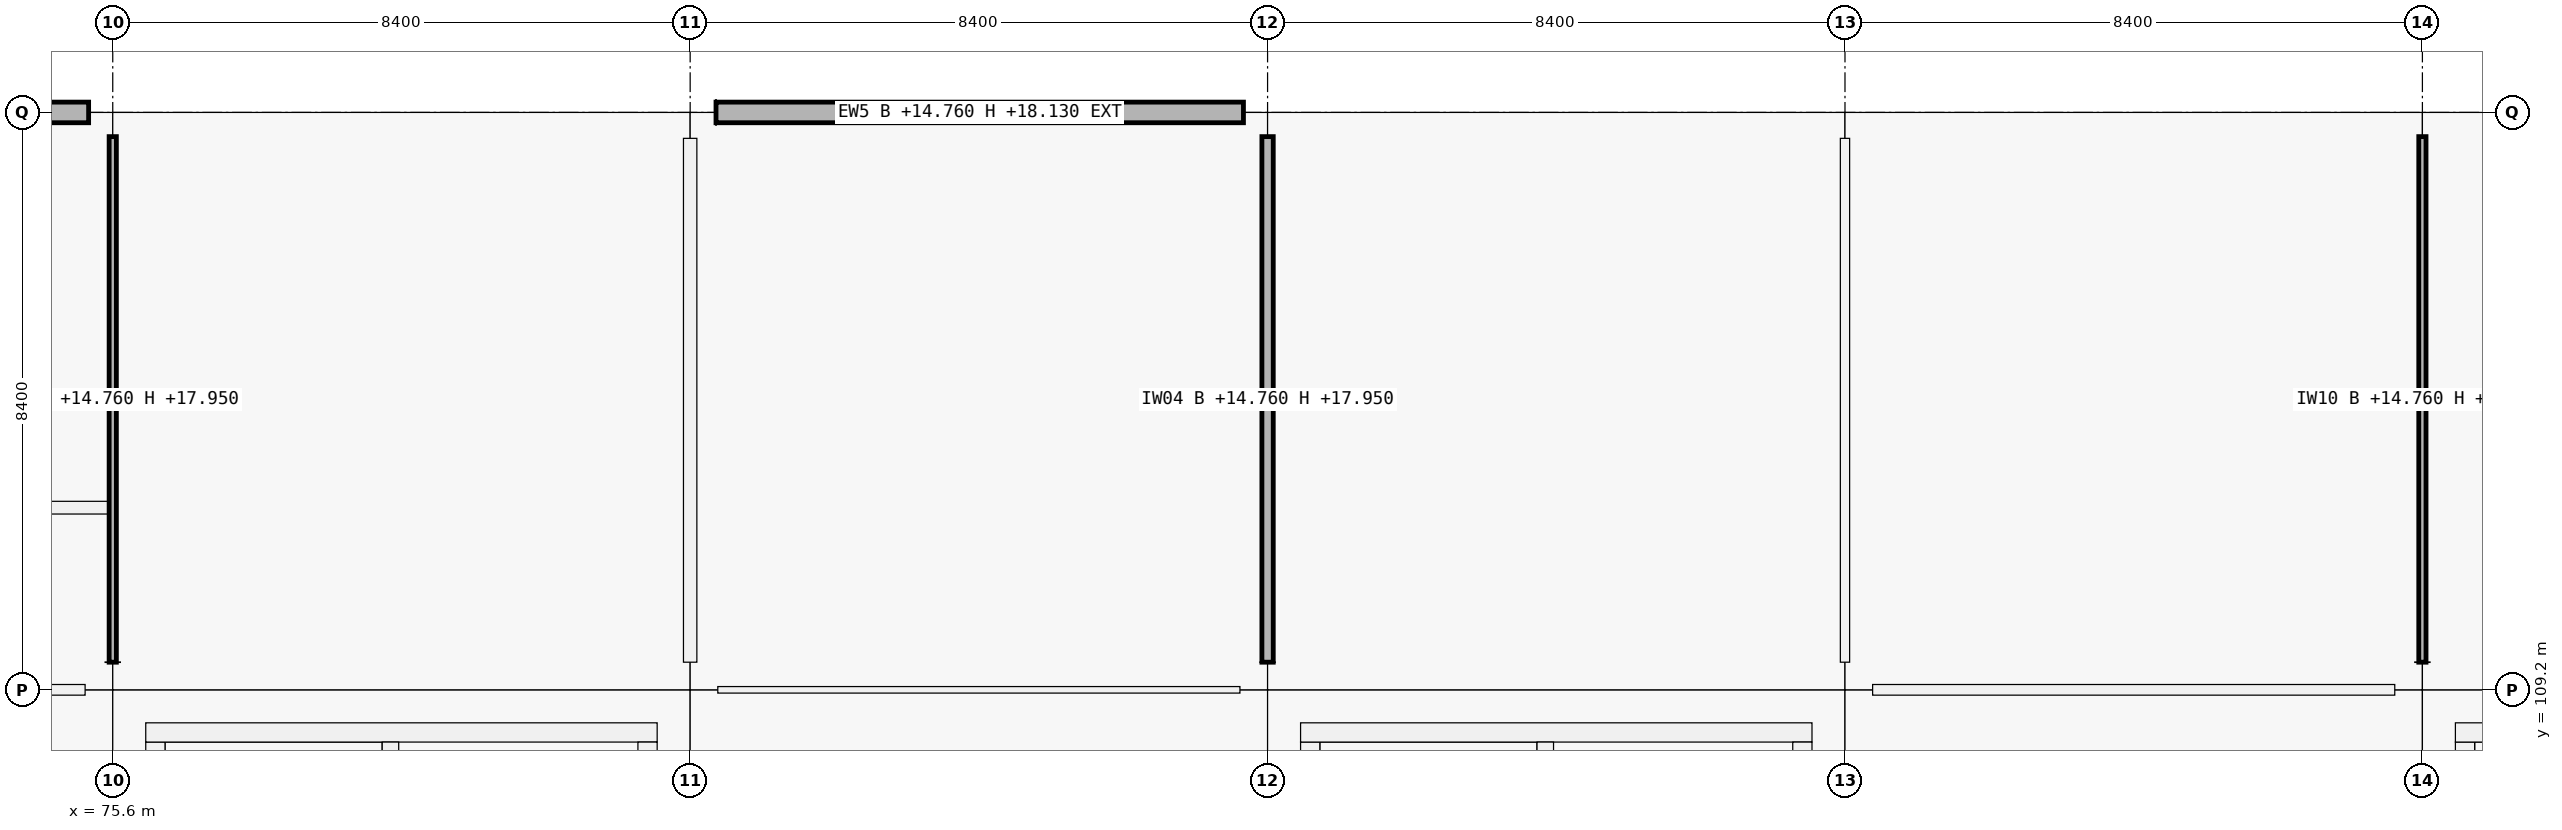
"""IFC4 building model, lengths in metres.
Left out: names, types, materials, properties, quantities, classifications, styles, units other than length and angle.
Written with IfcOpenShell. Run it as: python <this file> out.ifc"""

import sys

from ifc_helpers import new_model, si_unit, direction, frame, frame_2d, origin, origin_2d, place, context, subcontext, project, spatial, rectangle, extrude, element, fill, save


model = new_model("IFC4")
c1 = context("Model", 3, precision=1e-05, world=origin(), true_north=direction((0.0, 1.0)))
c2 = subcontext(c1, "Body", "Model", "MODEL_VIEW")
j1 = project(units=[si_unit("LENGTHUNIT", "METRE"), si_unit("PLANEANGLEUNIT", "RADIAN")], contexts=[c1])
p1 = place(None, origin())
s1 = spatial("IfcSite", under=j1, at=p1, CompositionType="ELEMENT")
p2 = place(p1, origin())
s2 = spatial("IfcBuilding", under=s1, at=p2, CompositionType="ELEMENT")
p3 = place(p2, frame((0.0, 0.0, 14.76)))
s3 = spatial("IfcBuildingStorey", under=s2, at=p3, CompositionType="ELEMENT", Elevation=14.76)
p4 = place(p3, frame((75.6, 109.2, 0.0), z_axis=(0.0, 0.0, 1.0), x_axis=(1.0, 0.0, 0.0)))
e1 = element("IfcColumn", 1, at=p4, inside=s3, PredefinedType="COLUMN", context=c2, shape_type="SweptSolid", body=[
    extrude(rectangle(XDim=0.8, YDim=0.8, at=origin_2d()), origin(), (0.0, 0.0, 1.0), 4.32),
])
p5 = place(p3, frame((75.6, 117.6, 0.0), z_axis=(0.0, 0.0, 1.0), x_axis=(1.0, 0.0, 0.0)))
e2 = element("IfcColumn", 2, at=p5, inside=s3, PredefinedType="COLUMN", context=c2, shape_type="SweptSolid", body=[
    extrude(rectangle(XDim=0.7, YDim=0.7, at=origin_2d()), origin(), (0.0, 0.0, 1.0), 4.32),
])
p6 = place(p3, frame((84.0, 109.2, 0.0), z_axis=(0.0, 0.0, 1.0), x_axis=(1.0, 0.0, 0.0)))
e3 = element("IfcColumn", 3, at=p6, inside=s3, PredefinedType="COLUMN", context=c2, shape_type="SweptSolid", body=[
    extrude(rectangle(XDim=0.8, YDim=0.8, at=origin_2d()), origin(), (0.0, 0.0, 1.0), 4.32),
])
p7 = place(p3, frame((84.0, 117.6, 0.0), z_axis=(0.0, 0.0, 1.0), x_axis=(1.0, 0.0, 0.0)))
e4 = element("IfcColumn", 4, at=p7, inside=s3, PredefinedType="COLUMN", context=c2, shape_type="SweptSolid", body=[
    extrude(rectangle(XDim=0.75, YDim=0.75, at=origin_2d()), origin(), (0.0, 0.0, 1.0), 4.32),
])
p8 = place(p3, frame((92.4, 109.2, 0.0), z_axis=(0.0, 0.0, 1.0), x_axis=(1.0, 0.0, 0.0)))
e5 = element("IfcColumn", 5, at=p8, inside=s3, PredefinedType="COLUMN", context=c2, shape_type="SweptSolid", body=[
    extrude(rectangle(XDim=0.8, YDim=0.8, at=origin_2d()), origin(), (0.0, 0.0, 1.0), 4.32),
])
p9 = place(p3, frame((92.4, 117.6, 0.0), z_axis=(0.0, 0.0, 1.0), x_axis=(1.0, 0.0, 0.0)))
e6 = element("IfcColumn", 6, at=p9, inside=s3, PredefinedType="COLUMN", context=c2, shape_type="SweptSolid", body=[
    extrude(rectangle(XDim=0.7, YDim=0.7, at=origin_2d()), origin(), (0.0, 0.0, 1.0), 4.32),
])
p10 = place(p3, frame((100.8, 109.2, 0.0), z_axis=(0.0, 0.0, 1.0), x_axis=(1.0, 0.0, 0.0)))
e7 = element("IfcColumn", 7, at=p10, inside=s3, PredefinedType="COLUMN", context=c2, shape_type="SweptSolid", body=[
    extrude(rectangle(XDim=0.8, YDim=0.8, at=origin_2d()), origin(), (0.0, 0.0, 1.0), 4.32),
])
p11 = place(p3, frame((100.8, 117.6, 0.0), z_axis=(0.0, 0.0, 1.0), x_axis=(1.0, 0.0, 0.0)))
e8 = element("IfcColumn", 8, at=p11, inside=s3, PredefinedType="COLUMN", context=c2, shape_type="SweptSolid", body=[
    extrude(rectangle(XDim=0.75, YDim=0.75, at=origin_2d()), origin(), (0.0, 0.0, 1.0), 4.32),
])
p12 = place(p3, frame((109.2, 109.2, 0.0), z_axis=(0.0, 0.0, 1.0), x_axis=(1.0, 0.0, 0.0)))
e9 = element("IfcColumn", 9, at=p12, inside=s3, PredefinedType="COLUMN", context=c2, shape_type="SweptSolid", body=[
    extrude(rectangle(XDim=0.8, YDim=0.8, at=origin_2d()), origin(), (0.0, 0.0, 1.0), 4.32),
])
p13 = place(p3, frame((109.2, 117.6, 0.0), z_axis=(0.0, 0.0, 1.0), x_axis=(1.0, 0.0, 0.0)))
e10 = element("IfcColumn", 10, at=p13, inside=s3, PredefinedType="COLUMN", context=c2, shape_type="SweptSolid", body=[
    extrude(rectangle(XDim=0.7, YDim=0.7, at=origin_2d()), origin(), (0.0, 0.0, 1.0), 4.32),
])
p14 = place(p3, frame((67.576, 117.6, 0.0), z_axis=(0.0, 0.0, 1.0), x_axis=(1.0, 0.0, 0.0)))
e11 = element("IfcWall", 11, at=p14, inside=s3, PredefinedType="SOLIDWALL", context=c2, shape_type="SweptSolid", body=[
    extrude(rectangle(XDim=7.673, YDim=0.3, at=frame_2d((3.836, 0.0))), origin(), (0.0, 0.0, 1.0), 3.37),
])
p15 = place(p14, frame((2.761, 0.0, 0.9)))
e12 = element("IfcOpeningElement", 12, at=p15, cuts=e11, PredefinedType="OPENING", context=c2, shape_type="SweptSolid", body=[
    extrude(rectangle(XDim=2.15, YDim=1.95, at=frame_2d((1.075, 0.975))), frame((0.0, 0.15, 0.0), z_axis=(0.0, -1.0, 0.0), x_axis=(1.0, 0.0, 0.0)), (0.0, 0.0, 1.0), 0.3),
])
p16 = place(p3, frame((84.376, 117.6, 0.0), z_axis=(0.0, 0.0, 1.0), x_axis=(1.0, 0.0, 0.0)))
e13 = element("IfcWall", 13, at=p16, inside=s3, PredefinedType="SOLIDWALL", context=c2, shape_type="SweptSolid", body=[
    extrude(rectangle(XDim=7.673, YDim=0.3, at=frame_2d((3.836, 0.0))), origin(), (0.0, 0.0, 1.0), 3.37),
])
p17 = place(p16, frame((2.662, 0.0, 0.9)))
e14 = element("IfcOpeningElement", 14, at=p17, cuts=e13, PredefinedType="OPENING", context=c2, shape_type="SweptSolid", body=[
    extrude(rectangle(XDim=2.35, YDim=1.6, at=frame_2d((1.175, 0.8))), frame((0.0, 0.15, 0.0), z_axis=(0.0, -1.0, 0.0), x_axis=(1.0, 0.0, 0.0)), (0.0, 0.0, 1.0), 0.3),
])
p18 = place(p3, frame((109.82, 101.56, 0.0), z_axis=(0.0, 0.0, 1.0), x_axis=(0.0, 1.0, 0.0)))
e15 = element("IfcWall", 15, at=p18, inside=s3, PredefinedType="SHEAR", context=c2, shape_type="SweptSolid", body=[
    extrude(rectangle(XDim=6.88, YDim=0.28, at=frame_2d((3.44, 0.0))), origin(), (0.0, 0.0, 1.0), 4.32),
])
p19 = place(p3, frame((109.68, 108.58, 0.0), z_axis=(0.0, 0.0, 1.0), x_axis=(1.0, 0.0, 0.0)))
e16 = element("IfcWall", 16, at=p19, inside=s3, PredefinedType="SHEAR", context=c2, shape_type="SweptSolid", body=[
    extrude(rectangle(XDim=7.44, YDim=0.28, at=frame_2d((3.72, 0.0))), origin(), (0.0, 0.0, 1.0), 4.32),
])
p20 = place(p3, frame((76.22, 101.56, 0.0), z_axis=(0.0, 0.0, 1.0), x_axis=(0.0, 1.0, 0.0)))
e17 = element("IfcWall", 17, at=p20, inside=s3, PredefinedType="SHEAR", context=c2, shape_type="SweptSolid", body=[
    extrude(rectangle(XDim=6.88, YDim=0.28, at=frame_2d((3.44, 0.0))), origin(), (0.0, 0.0, 1.0), 4.32),
])
p21 = place(p3, frame((76.08, 108.58, 0.0), z_axis=(0.0, 0.0, 1.0), x_axis=(1.0, 0.0, 0.0)))
e18 = element("IfcWall", 18, at=p21, inside=s3, PredefinedType="SHEAR", context=c2, shape_type="SweptSolid", body=[
    extrude(rectangle(XDim=7.44, YDim=0.28, at=frame_2d((3.72, 0.0))), origin(), (0.0, 0.0, 1.0), 4.32),
])
p22 = place(p3, frame((83.38, 108.44, 0.0), z_axis=(0.0, 0.0, 1.0), x_axis=(0.0, -1.0, 0.0)))
e19 = element("IfcWall", 19, at=p22, inside=s3, PredefinedType="SHEAR", context=c2, shape_type="SweptSolid", body=[
    extrude(rectangle(XDim=6.88, YDim=0.28, at=frame_2d((3.44, 0.0))), origin(), (0.0, 0.0, 1.0), 4.32),
])
p23 = place(p22, frame((3.99, 0.0, 0.0)))
e20 = element("IfcOpeningElement", 20, at=p23, cuts=e19, PredefinedType="OPENING", context=c2, shape_type="SweptSolid", body=[
    extrude(rectangle(XDim=1.5, YDim=2.15, at=frame_2d((0.75, 1.075))), frame((0.0, 0.14, 0.0), z_axis=(0.0, -1.0, 0.0), x_axis=(1.0, 0.0, 0.0)), (0.0, 0.0, 1.0), 0.28),
])
p24 = place(p3, frame((79.64, 101.56, 0.0), z_axis=(0.0, 0.0, 1.0), x_axis=(0.0, 1.0, 0.0)))
e21 = element("IfcWall", 21, at=p24, inside=s3, PredefinedType="SHEAR", context=c2, shape_type="SweptSolid", body=[
    extrude(rectangle(XDim=6.88, YDim=0.24, at=frame_2d((3.44, 0.0))), origin(), (0.0, 0.0, 1.0), 4.32),
])
p25 = place(p24, frame((0.12, 0.0, 0.0)))
e22 = element("IfcOpeningElement", 22, at=p25, cuts=e21, PredefinedType="OPENING", context=c2, shape_type="SweptSolid", body=[
    extrude(rectangle(XDim=1.0, YDim=2.15, at=frame_2d((0.5, 1.075))), frame((0.0, 0.12, 0.0), z_axis=(0.0, -1.0, 0.0), x_axis=(1.0, 0.0, 0.0)), (0.0, 0.0, 1.0), 0.24),
])
p26 = place(p3, frame((93.02, 101.56, 0.0), z_axis=(0.0, 0.0, 1.0), x_axis=(0.0, 1.0, 0.0)))
e23 = element("IfcWall", 23, at=p26, inside=s3, PredefinedType="SHEAR", context=c2, shape_type="SweptSolid", body=[
    extrude(rectangle(XDim=6.88, YDim=0.28, at=frame_2d((3.44, 0.0))), origin(), (0.0, 0.0, 1.0), 4.32),
])
p27 = place(p3, frame((92.88, 108.58, 0.0), z_axis=(0.0, 0.0, 1.0), x_axis=(1.0, 0.0, 0.0)))
e24 = element("IfcWall", 24, at=p27, inside=s3, PredefinedType="SHEAR", context=c2, shape_type="SweptSolid", body=[
    extrude(rectangle(XDim=7.44, YDim=0.28, at=frame_2d((3.72, 0.0))), origin(), (0.0, 0.0, 1.0), 4.32),
])
p28 = place(p3, frame((100.18, 108.44, 0.0), z_axis=(0.0, 0.0, 1.0), x_axis=(0.0, -1.0, 0.0)))
e25 = element("IfcWall", 25, at=p28, inside=s3, PredefinedType="SHEAR", context=c2, shape_type="SweptSolid", body=[
    extrude(rectangle(XDim=6.88, YDim=0.28, at=frame_2d((3.44, 0.0))), origin(), (0.0, 0.0, 1.0), 4.32),
])
p29 = place(p28, frame((3.99, 0.0, 0.0)))
e26 = element("IfcOpeningElement", 26, at=p29, cuts=e25, PredefinedType="OPENING", context=c2, shape_type="SweptSolid", body=[
    extrude(rectangle(XDim=1.5, YDim=2.15, at=frame_2d((0.75, 1.075))), frame((0.0, 0.14, 0.0), z_axis=(0.0, -1.0, 0.0), x_axis=(1.0, 0.0, 0.0)), (0.0, 0.0, 1.0), 0.28),
])
p30 = place(p3, frame((96.44, 101.56, 0.0), z_axis=(0.0, 0.0, 1.0), x_axis=(0.0, 1.0, 0.0)))
e27 = element("IfcWall", 27, at=p30, inside=s3, PredefinedType="SHEAR", context=c2, shape_type="SweptSolid", body=[
    extrude(rectangle(XDim=6.88, YDim=0.24, at=frame_2d((3.44, 0.0))), origin(), (0.0, 0.0, 1.0), 4.32),
])
p31 = place(p30, frame((0.12, 0.0, 0.0)))
e28 = element("IfcOpeningElement", 28, at=p31, cuts=e27, PredefinedType="OPENING", context=c2, shape_type="SweptSolid", body=[
    extrude(rectangle(XDim=1.0, YDim=2.15, at=frame_2d((0.5, 1.075))), frame((0.0, 0.12, 0.0), z_axis=(0.0, -1.0, 0.0), x_axis=(1.0, 0.0, 0.0)), (0.0, 0.0, 1.0), 0.24),
])
p32 = place(p3, frame((67.602, 109.2, 0.0), z_axis=(0.0, 0.0, 1.0), x_axis=(1.0, 0.0, 0.0)))
e29 = element("IfcWall", 29, at=p32, inside=s3, PredefinedType="PARTITIONING", context=c2, shape_type="SweptSolid", body=[
    extrude(rectangle(XDim=7.596, YDim=0.155, at=frame_2d((3.798, 0.0))), origin(), (0.0, 0.0, 1.0), 3.19),
])
p33 = place(p3, frame((84.402, 109.2, 0.0), z_axis=(0.0, 0.0, 1.0), x_axis=(1.0, 0.0, 0.0)))
e30 = element("IfcWall", 30, at=p33, inside=s3, PredefinedType="PARTITIONING", context=c2, shape_type="SweptSolid", body=[
    extrude(rectangle(XDim=7.596, YDim=0.095, at=frame_2d((3.798, 0.0))), origin(), (0.0, 0.0, 1.0), 3.19),
])
p34 = place(p33, frame((3.308, 0.0, 0.0)))
e31 = element("IfcOpeningElement", 31, at=p34, cuts=e30, PredefinedType="OPENING", context=c2, shape_type="SweptSolid", body=[
    extrude(rectangle(XDim=0.98, YDim=2.18, at=frame_2d((0.49, 1.09))), frame((0.0, 0.047, 0.0), z_axis=(0.0, -1.0, 0.0), x_axis=(1.0, 0.0, 0.0)), (0.0, 0.0, 1.0), 0.095),
])
p35 = place(p3, frame((101.202, 109.2, 0.0), z_axis=(0.0, 0.0, 1.0), x_axis=(1.0, 0.0, 0.0)))
e32 = element("IfcWall", 32, at=p35, inside=s3, PredefinedType="PARTITIONING", context=c2, shape_type="SweptSolid", body=[
    extrude(rectangle(XDim=7.596, YDim=0.155, at=frame_2d((3.798, 0.0))), origin(), (0.0, 0.0, 1.0), 3.19),
])
p36 = place(p35, frame((3.273, 0.0, 0.0)))
e33 = element("IfcOpeningElement", 33, at=p36, cuts=e32, PredefinedType="OPENING", context=c2, shape_type="SweptSolid", body=[
    extrude(rectangle(XDim=1.05, YDim=2.12, at=frame_2d((0.525, 1.06))), frame((0.0, 0.078, 0.0), z_axis=(0.0, -1.0, 0.0), x_axis=(1.0, 0.0, 0.0)), (0.0, 0.0, 1.0), 0.155),
])
p37 = place(p3, frame((75.6, 109.602, 0.0), z_axis=(0.0, 0.0, 1.0), x_axis=(0.0, 1.0, 0.0)))
e34 = element("IfcWall", 34, at=p37, inside=s3, PredefinedType="PARTITIONING", context=c2, shape_type="SweptSolid", body=[
    extrude(rectangle(XDim=7.646, YDim=0.105, at=frame_2d((3.823, 0.0))), origin(), (0.0, 0.0, 1.0), 3.19),
])
p38 = place(p3, frame((84.0, 109.602, 0.0), z_axis=(0.0, 0.0, 1.0), x_axis=(0.0, 1.0, 0.0)))
e35 = element("IfcWall", 35, at=p38, inside=s3, PredefinedType="PARTITIONING", context=c2, shape_type="SweptSolid", body=[
    extrude(rectangle(XDim=7.621, YDim=0.195, at=frame_2d((3.811, 0.0))), origin(), (0.0, 0.0, 1.0), 3.19),
])
p39 = place(p38, frame((3.301, 0.0, 0.0)))
e36 = element("IfcOpeningElement", 36, at=p39, cuts=e35, PredefinedType="OPENING", context=c2, shape_type="SweptSolid", body=[
    extrude(rectangle(XDim=1.02, YDim=2.2, at=frame_2d((0.51, 1.1))), frame((0.0, 0.098, 0.0), z_axis=(0.0, -1.0, 0.0), x_axis=(1.0, 0.0, 0.0)), (0.0, 0.0, 1.0), 0.195),
])
p40 = place(p3, frame((92.4, 109.602, 0.0), z_axis=(0.0, 0.0, 1.0), x_axis=(0.0, 1.0, 0.0)))
e37 = element("IfcWall", 37, at=p40, inside=s3, PredefinedType="PARTITIONING", context=c2, shape_type="SweptSolid", body=[
    extrude(rectangle(XDim=7.646, YDim=0.165, at=frame_2d((3.823, 0.0))), origin(), (0.0, 0.0, 1.0), 3.19),
])
p41 = place(p40, frame((3.323, 0.0, 0.0)))
e38 = element("IfcOpeningElement", 38, at=p41, cuts=e37, PredefinedType="OPENING", context=c2, shape_type="SweptSolid", body=[
    extrude(rectangle(XDim=1.0, YDim=2.2, at=frame_2d((0.5, 1.1))), frame((0.0, 0.083, 0.0), z_axis=(0.0, -1.0, 0.0), x_axis=(1.0, 0.0, 0.0)), (0.0, 0.0, 1.0), 0.165),
])
p42 = place(p3, frame((100.8, 109.602, 0.0), z_axis=(0.0, 0.0, 1.0), x_axis=(0.0, 1.0, 0.0)))
e39 = element("IfcWall", 39, at=p42, inside=s3, PredefinedType="PARTITIONING", context=c2, shape_type="SweptSolid", body=[
    extrude(rectangle(XDim=7.621, YDim=0.135, at=frame_2d((3.811, 0.0))), origin(), (0.0, 0.0, 1.0), 3.19),
])
p43 = place(p42, frame((3.291, 0.0, 0.0)))
e40 = element("IfcOpeningElement", 40, at=p43, cuts=e39, PredefinedType="OPENING", context=c2, shape_type="SweptSolid", body=[
    extrude(rectangle(XDim=1.04, YDim=2.2, at=frame_2d((0.52, 1.1))), frame((0.0, 0.067, 0.0), z_axis=(0.0, -1.0, 0.0), x_axis=(1.0, 0.0, 0.0)), (0.0, 0.0, 1.0), 0.135),
])
p44 = place(p3, frame((109.2, 109.602, 0.0), z_axis=(0.0, 0.0, 1.0), x_axis=(0.0, 1.0, 0.0)))
e41 = element("IfcWall", 41, at=p44, inside=s3, PredefinedType="PARTITIONING", context=c2, shape_type="SweptSolid", body=[
    extrude(rectangle(XDim=7.646, YDim=0.105, at=frame_2d((3.823, 0.0))), origin(), (0.0, 0.0, 1.0), 3.19),
])
p45 = place(p44, frame((3.333, 0.0, 0.0)))
e42 = element("IfcOpeningElement", 42, at=p45, cuts=e41, PredefinedType="OPENING", context=c2, shape_type="SweptSolid", body=[
    extrude(rectangle(XDim=0.98, YDim=2.18, at=frame_2d((0.49, 1.09))), frame((0.0, 0.052, 0.0), z_axis=(0.0, -1.0, 0.0), x_axis=(1.0, 0.0, 0.0)), (0.0, 0.0, 1.0), 0.105),
])
p46 = place(p3, frame((67.27, 111.85, 0.0), z_axis=(0.0, 0.0, 1.0), x_axis=(1.0, 0.0, 0.0)))
e43 = element("IfcWall", 43, at=p46, inside=s3, PredefinedType="PARTITIONING", context=c2, shape_type="SweptSolid", body=[
    extrude(rectangle(XDim=8.276, YDim=0.185, at=frame_2d((4.138, 0.0))), origin(), (0.0, 0.0, 1.0), 3.19),
])
p47 = place(p17, origin())
e44 = element("IfcWindow", 44, at=p47, inside=s3, PartitioningType="SINGLE_PANEL", PredefinedType="WINDOW", context=c2, shape_type="SweptSolid", body=[
    extrude(rectangle(XDim=2.35, YDim=1.6, at=frame_2d((1.175, 0.8))), frame((0.0, 0.03, 0.0), z_axis=(0.0, -1.0, 0.0), x_axis=(1.0, 0.0, 0.0)), (0.0, 0.0, 1.0), 0.06),
])
fill(e14, e44)
p48 = place(p34, origin())
e45 = element("IfcDoor", 45, at=p48, inside=s3, OperationType="SINGLE_SWING_LEFT", PredefinedType="DOOR", context=c2, shape_type="SweptSolid", body=[
    extrude(rectangle(XDim=0.98, YDim=2.18, at=frame_2d((0.49, 1.09))), frame((0.0, 0.025, 0.0), z_axis=(0.0, -1.0, 0.0), x_axis=(1.0, 0.0, 0.0)), (0.0, 0.0, 1.0), 0.05),
])
fill(e31, e45)
p49 = place(p36, origin())
e46 = element("IfcDoor", 46, at=p49, inside=s3, OperationType="SINGLE_SWING_RIGHT", PredefinedType="DOOR", context=c2, shape_type="SweptSolid", body=[
    extrude(rectangle(XDim=1.05, YDim=2.12, at=frame_2d((0.525, 1.06))), frame((0.0, 0.025, 0.0), z_axis=(0.0, -1.0, 0.0), x_axis=(1.0, 0.0, 0.0)), (0.0, 0.0, 1.0), 0.05),
])
fill(e33, e46)
p50 = place(p39, origin())
e47 = element("IfcDoor", 47, at=p50, inside=s3, OperationType="SINGLE_SWING_LEFT", PredefinedType="DOOR", context=c2, shape_type="SweptSolid", body=[
    extrude(rectangle(XDim=1.02, YDim=2.2, at=frame_2d((0.51, 1.1))), frame((0.0, 0.025, 0.0), z_axis=(0.0, -1.0, 0.0), x_axis=(1.0, 0.0, 0.0)), (0.0, 0.0, 1.0), 0.05),
])
fill(e36, e47)
p51 = place(p41, origin())
e48 = element("IfcDoor", 48, at=p51, inside=s3, OperationType="SINGLE_SWING_RIGHT", PredefinedType="DOOR", context=c2, shape_type="SweptSolid", body=[
    extrude(rectangle(XDim=1.0, YDim=2.2, at=frame_2d((0.5, 1.1))), frame((0.0, 0.025, 0.0), z_axis=(0.0, -1.0, 0.0), x_axis=(1.0, 0.0, 0.0)), (0.0, 0.0, 1.0), 0.05),
])
fill(e38, e48)
p52 = place(p45, origin())
e49 = element("IfcDoor", 49, at=p52, inside=s3, OperationType="SINGLE_SWING_LEFT", PredefinedType="DOOR", context=c2, shape_type="SweptSolid", body=[
    extrude(rectangle(XDim=0.98, YDim=2.18, at=frame_2d((0.49, 1.09))), frame((0.0, 0.025, 0.0), z_axis=(0.0, -1.0, 0.0), x_axis=(1.0, 0.0, 0.0)), (0.0, 0.0, 1.0), 0.05),
])
fill(e42, e49)
p53 = place(p43, origin())
e50 = element("IfcDoor", 50, at=p53, inside=s3, OperationType="SINGLE_SWING_LEFT", PredefinedType="DOOR", context=c2, shape_type="SweptSolid", body=[
    extrude(rectangle(XDim=1.04, YDim=2.2, at=frame_2d((0.52, 1.1))), frame((0.0, 0.025, 0.0), z_axis=(0.0, -1.0, 0.0), x_axis=(1.0, 0.0, 0.0)), (0.0, 0.0, 1.0), 0.05),
])
fill(e40, e50)
save(model, sys.argv[1])
